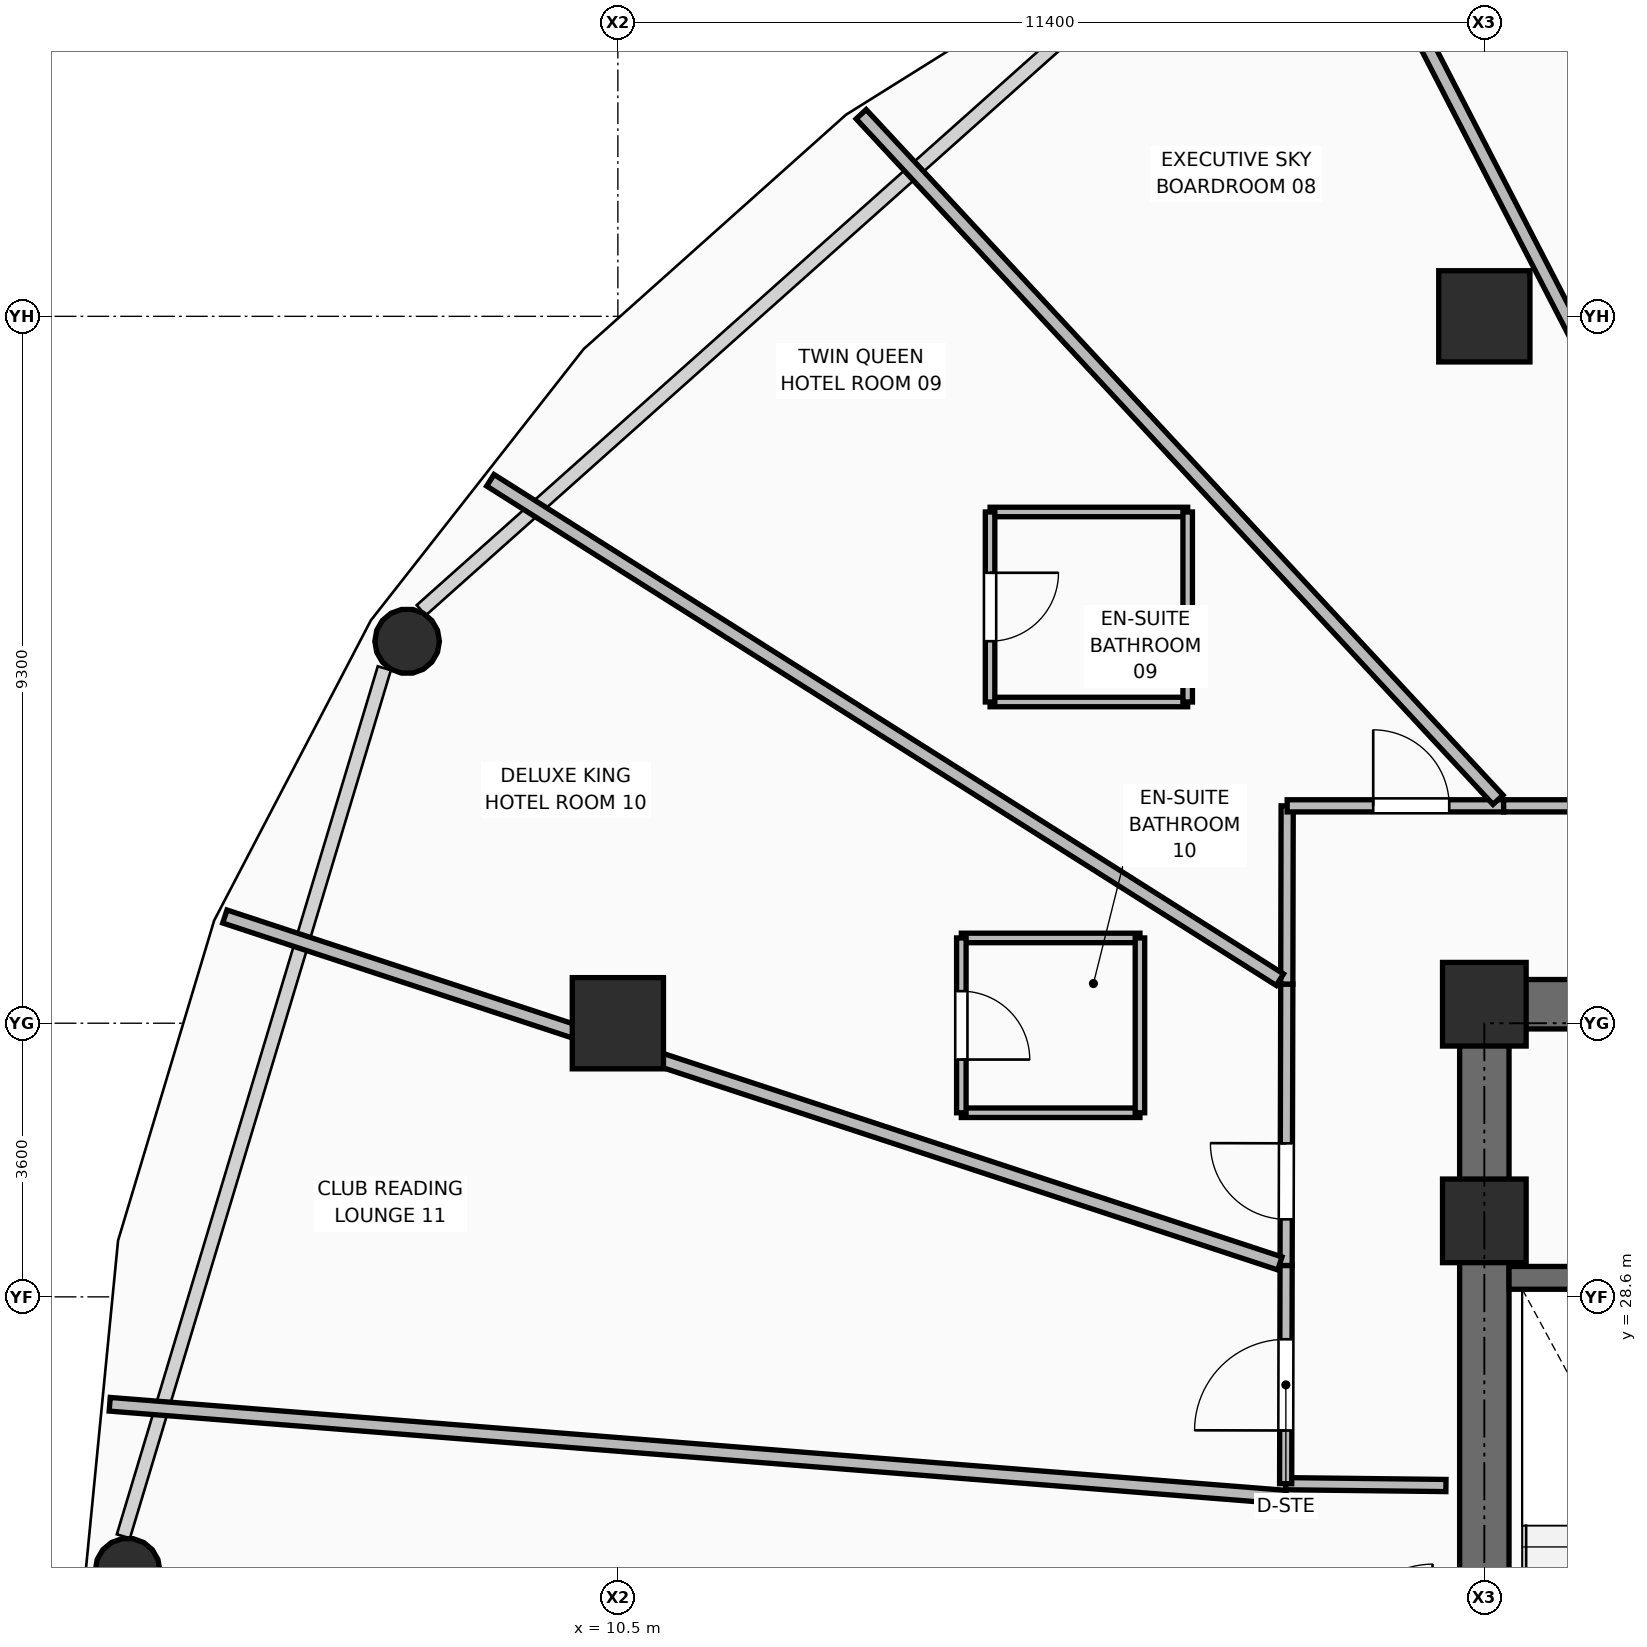
"""IFC4 building model, lengths in metres.
Left out: names, types, materials, properties, quantities, classifications, styles, units other than length and angle.
Written with IfcOpenShell. Run it as: python <this file> out.ifc"""

import sys

from ifc_helpers import new_model, si_unit, direction, frame, frame_2d, origin, origin_2d, place, context, subcontext, project, spatial, rectangle, hollow_rectangle, hollow_circle, extrude, element, fill, save


model = new_model("IFC4")
c1 = context("Model", 3, precision=1e-05, world=origin(), true_north=direction((0.0, 1.0)))
c2 = subcontext(c1, "Body", "Model", "MODEL_VIEW")
j1 = project(units=[si_unit("LENGTHUNIT", "METRE"), si_unit("PLANEANGLEUNIT", "RADIAN")], contexts=[c1])
p1 = place(None, origin())
s1 = spatial("IfcSite", under=j1, at=p1, CompositionType="ELEMENT")
p2 = place(p1, origin())
s2 = spatial("IfcBuilding", under=s1, at=p2, CompositionType="ELEMENT")
p3 = place(p2, frame((0.0, 0.0, 64.5)))
s3 = spatial("IfcBuildingStorey", under=s2, at=p3, CompositionType="ELEMENT", Elevation=64.5)
for number, where, z_axis, x_axis in (
    (1, (21.9, 29.6, 0.0), (0.0, 0.0, 1.0), (1.0, 0.0, 0.0)),
    (2, (21.9, 32.45, 0.0), (0.0, 0.0, 1.0), (1.0, 0.0, 0.0)),
):
    element("IfcColumn", number, at=place(p3, frame(where, z_axis=z_axis, x_axis=x_axis)), inside=s3, PredefinedType="COLUMN", context=c2, shape_type="SweptSolid", body=[
        extrude(rectangle(XDim=1.1, YDim=1.1, at=origin_2d()), origin(), (0.0, 0.0, 1.0), 3.75),
    ])
for number, where, z_axis, x_axis in (
    (3, (10.5, 32.2, 0.0), (0.0, 0.0, 1.0), (1.0, 0.0, 0.0)),
    (4, (21.9, 41.5, 0.0), (0.0, 0.0, 1.0), (1.0, 0.0, 0.0)),
):
    element("IfcColumn", number, at=place(p3, frame(where, z_axis=z_axis, x_axis=x_axis)), inside=s3, PredefinedType="COLUMN", context=c2, shape_type="SweptSolid", body=[
        extrude(hollow_rectangle(XDim=1.2, YDim=1.2, WallThickness=0.045, at=origin_2d()), origin(), (0.0, 0.0, 1.0), 3.75),
    ])
p4 = place(p3, frame((7.727, 37.225, 0.0), z_axis=(-0.048413411524, 0.024855404506, 0.998518077178), x_axis=(-0.456724176891, -0.889608355538, 0.0)))
e5 = element("IfcColumn", 5, at=p4, inside=s3, PredefinedType="COLUMN", context=c2, shape_type="SweptSolid", body=[
    extrude(hollow_circle(Radius=0.425, WallThickness=0.04, at=origin_2d()), origin(), (0.0, 0.0, 1.0), 3.575),
])
p5 = place(p3, frame((4.049, 25.0, 0.0), z_axis=(-0.055647755416, 0.0, 0.998450463126), x_axis=(0.0, -1.0, 0.0)))
e6 = element("IfcColumn", 6, at=p5, inside=s3, PredefinedType="COLUMN", context=c2, shape_type="SweptSolid", body=[
    extrude(hollow_circle(Radius=0.425, WallThickness=0.04, at=origin_2d()), origin(), (0.0, 0.0, 1.0), 3.576),
])
p6 = place(p3, frame((21.575, 32.45, 0.0), z_axis=(0.0, 0.0, 1.0), x_axis=(1.0, 0.0, 0.0)))
e7 = element("IfcWall", 7, at=p6, inside=s3, PredefinedType="SHEAR", context=c2, shape_type="SweptSolid", body=[
    extrude(rectangle(XDim=19.85, YDim=0.65, at=frame_2d((9.925, 0.0))), origin(), (0.0, 0.0, 1.0), 3.57),
])
p7 = place(p6, frame((2.175, 0.0, 0.0)))
e8 = element("IfcOpeningElement", 8, at=p7, cuts=e7, PredefinedType="OPENING", context=c2, shape_type="SweptSolid", body=[
    extrude(rectangle(XDim=1.1, YDim=2.1, at=frame_2d((0.55, 1.05))), frame((0.0, 0.335, 0.0), z_axis=(0.0, -1.0, 0.0), x_axis=(1.0, 0.0, 0.0)), (0.0, 0.0, 1.0), 0.67),
])
p8 = place(p6, frame((15.565, 0.0, 0.0)))
e9 = element("IfcOpeningElement", 9, at=p8, cuts=e7, PredefinedType="OPENING", context=c2, shape_type="SweptSolid", body=[
    extrude(rectangle(XDim=1.0, YDim=2.1, at=frame_2d((0.5, 1.05))), frame((0.0, 0.335, 0.0), z_axis=(0.0, -1.0, 0.0), x_axis=(1.0, 0.0, 0.0)), (0.0, 0.0, 1.0), 0.67),
])
p9 = place(p6, frame((17.575, 0.0, 0.0)))
e10 = element("IfcOpeningElement", 10, at=p9, cuts=e7, PredefinedType="OPENING", context=c2, shape_type="SweptSolid", body=[
    extrude(rectangle(XDim=0.9, YDim=2.1, at=frame_2d((0.45, 1.05))), frame((0.0, 0.335, 0.0), z_axis=(0.0, -1.0, 0.0), x_axis=(1.0, 0.0, 0.0)), (0.0, 0.0, 1.0), 0.67),
])
p10 = place(p3, frame((21.9, 18.125, 0.0), z_axis=(0.0, 0.0, 1.0), x_axis=(0.0, 1.0, 0.0)))
e11 = element("IfcWall", 11, at=p10, inside=s3, PredefinedType="SHEAR", context=c2, shape_type="SweptSolid", body=[
    extrude(rectangle(XDim=14.0, YDim=0.65, at=frame_2d((7.0, 0.0))), origin(), (0.0, 0.0, 1.0), 3.57),
])
p11 = place(p3, frame((22.225, 28.85, 0.0), z_axis=(0.0, 0.0, 1.0), x_axis=(1.0, 0.0, 0.0)))
e12 = element("IfcWall", 12, at=p11, inside=s3, PredefinedType="SHEAR", context=c2, shape_type="SweptSolid", body=[
    extrude(rectangle(XDim=3.515, YDim=0.3, at=frame_2d((1.757, 0.0))), origin(), (0.0, 0.0, 1.0), 3.57),
])
p12 = place(p3, frame((21.395, 26.118, 0.0), z_axis=(0.0, 0.0, 1.0), x_axis=(-0.999934344566, 0.011458907294, 0.0)))
e13 = element("IfcWall", 13, at=p12, inside=s3, PredefinedType="PARTITIONING", context=c2, shape_type="SweptSolid", body=[
    extrude(rectangle(XDim=2.109, YDim=0.16, at=frame_2d((1.055, 0.0))), origin(), (0.0, 0.0, 1.0), 3.55),
])
p13 = place(p3, frame((19.286, 26.142, 0.0), z_axis=(0.0, 0.0, 1.0), x_axis=(0.00212602632, 0.999997740003, 0.0)))
e14 = element("IfcWall", 14, at=p13, inside=s3, PredefinedType="PARTITIONING", context=c2, shape_type="SweptSolid", body=[
    extrude(rectangle(XDim=2.871, YDim=0.16, at=frame_2d((1.436, 0.0))), origin(), (0.0, 0.0, 1.0), 3.55),
])
p14 = place(p13, frame((0.7, 0.0, 0.0)))
e15 = element("IfcOpeningElement", 15, at=p14, cuts=e14, PredefinedType="OPENING", context=c2, shape_type="SweptSolid", body=[
    extrude(rectangle(XDim=1.2, YDim=2.1, at=frame_2d((0.6, 1.05))), frame((0.0, 0.09, 0.0), z_axis=(0.0, -1.0, 0.0), x_axis=(1.0, 0.0, 0.0)), (0.0, 0.0, 1.0), 0.18),
])
p15 = place(p3, frame((19.292, 29.013, 0.0), z_axis=(0.0, 0.0, 1.0), x_axis=(0.002439982185, 0.999997023239, 0.0)))
e16 = element("IfcWall", 16, at=p15, inside=s3, PredefinedType="PARTITIONING", context=c2, shape_type="SweptSolid", body=[
    extrude(rectangle(XDim=3.702, YDim=0.16, at=frame_2d((1.851, 0.0))), origin(), (0.0, 0.0, 1.0), 3.55),
])
p16 = place(p15, frame((0.607, 0.0, 0.0)))
e17 = element("IfcOpeningElement", 17, at=p16, cuts=e16, PredefinedType="OPENING", context=c2, shape_type="SweptSolid", body=[
    extrude(rectangle(XDim=1.0, YDim=2.1, at=frame_2d((0.5, 1.05))), frame((0.0, 0.09, 0.0), z_axis=(0.0, -1.0, 0.0), x_axis=(1.0, 0.0, 0.0)), (0.0, 0.0, 1.0), 0.18),
])
p17 = place(p3, frame((19.301, 32.715, 0.0), z_axis=(0.0, 0.0, 1.0), x_axis=(0.002082244315, 0.999997832127, 0.0)))
e18 = element("IfcWall", 18, at=p17, inside=s3, PredefinedType="PARTITIONING", context=c2, shape_type="SweptSolid", body=[
    extrude(rectangle(XDim=2.345, YDim=0.16, at=frame_2d((1.172, 0.0))), origin(), (0.0, 0.0, 1.0), 2.928),
])
p18 = place(p3, frame((19.306, 35.06, 0.0), z_axis=(0.0, 0.0, 1.0), x_axis=(1.0, 0.0, 0.0)))
e19 = element("IfcWall", 19, at=p18, inside=s3, PredefinedType="PARTITIONING", context=c2, shape_type="SweptSolid", body=[
    extrude(rectangle(XDim=2.848, YDim=0.16, at=frame_2d((1.424, 0.0))), origin(), (0.0, 0.0, 1.0), 2.928),
])
p19 = place(p18, frame((1.132, 0.0, 0.0)))
e20 = element("IfcOpeningElement", 20, at=p19, cuts=e19, PredefinedType="OPENING", context=c2, shape_type="SweptSolid", body=[
    extrude(rectangle(XDim=1.0, YDim=2.1, at=frame_2d((0.5, 1.05))), frame((0.0, 0.09, 0.0), z_axis=(0.0, -1.0, 0.0), x_axis=(1.0, 0.0, 0.0)), (0.0, 0.0, 1.0), 0.18),
])
p20 = place(p3, frame((22.154, 35.06, 0.0), z_axis=(0.0, 0.0, 1.0), x_axis=(1.0, 0.0, 0.0)))
e21 = element("IfcWall", 21, at=p20, inside=s3, PredefinedType="PARTITIONING", context=c2, shape_type="SweptSolid", body=[
    extrude(rectangle(XDim=4.152, YDim=0.16, at=frame_2d((2.076, 0.0))), origin(), (0.0, 0.0, 1.0), 3.55),
])
p21 = place(p20, frame((1.476, 0.0, 0.0)))
e22 = element("IfcOpeningElement", 22, at=p21, cuts=e21, PredefinedType="OPENING", context=c2, shape_type="SweptSolid", body=[
    extrude(rectangle(XDim=1.2, YDim=2.1, at=frame_2d((0.6, 1.05))), frame((0.0, 0.09, 0.0), z_axis=(0.0, -1.0, 0.0), x_axis=(1.0, 0.0, 0.0)), (0.0, 0.0, 1.0), 0.18),
])
p22 = place(p3, frame((26.265, 35.14, 0.0), z_axis=(0.0, 0.0, 1.0), x_axis=(-0.458704466824, 0.888588888134, 0.0)))
e23 = element("IfcWall", 23, at=p22, inside=s3, PredefinedType="PARTITIONING", context=c2, shape_type="SweptSolid", body=[
    extrude(rectangle(XDim=13.944, YDim=0.18, at=frame_2d((6.972, 0.0))), origin(), (0.0, 0.0, 1.0), 2.775),
])
p23 = place(p3, frame((22.08, 35.14, 0.0), z_axis=(0.0, 0.0, 1.0), x_axis=(-0.680639721347, 0.732618297427, 0.0)))
e24 = element("IfcWall", 24, at=p23, inside=s3, PredefinedType="PARTITIONING", context=c2, shape_type="SweptSolid", body=[
    extrude(rectangle(XDim=12.311, YDim=0.18, at=frame_2d((6.155, 0.0))), origin(), (0.0, 0.0, 1.0), 2.775),
])
p24 = place(p3, frame((19.21, 32.773, 0.0), z_axis=(0.0, 0.0, 1.0), x_axis=(-0.845148426003, 0.534531699738, 0.0)))
e25 = element("IfcWall", 25, at=p24, inside=s3, PredefinedType="PARTITIONING", context=c2, shape_type="SweptSolid", body=[
    extrude(rectangle(XDim=12.291, YDim=0.18, at=frame_2d((6.146, 0.0))), origin(), (0.0, 0.0, 1.0), 2.775),
])
p25 = place(p3, frame((19.21, 29.04, 0.0), z_axis=(0.0, 0.0, 1.0), x_axis=(-0.949968589429, 0.312345448339, 0.0)))
e26 = element("IfcWall", 26, at=p25, inside=s3, PredefinedType="PARTITIONING", context=c2, shape_type="SweptSolid", body=[
    extrude(rectangle(XDim=14.612, YDim=0.18, at=frame_2d((7.306, 0.0))), origin(), (0.0, 0.0, 1.0), 2.775),
])
p26 = place(p3, frame((19.284, 25.965, 0.0), z_axis=(0.0, 0.0, 1.0), x_axis=(-0.996895062006, 0.078741573192, 0.0)))
e27 = element("IfcWall", 27, at=p26, inside=s3, PredefinedType="PARTITIONING", context=c2, shape_type="SweptSolid", body=[
    extrude(rectangle(XDim=15.518, YDim=0.18, at=frame_2d((7.759, 0.0))), origin(), (0.0, 0.0, 1.0), 2.775),
])
for number, where, z_axis, x_axis in (
    (28, (15.397, 36.426, 0.0), (0.0, 0.0, 1.0), (1.0, 0.0, 0.0)),
    (29, (15.397, 38.926, 0.0), (0.0, 0.0, 1.0), (1.0, 0.0, 0.0)),
):
    element("IfcWall", number, at=place(p3, frame(where, z_axis=z_axis, x_axis=x_axis)), inside=s3, PredefinedType="PARTITIONING", context=c2, shape_type="SweptSolid", body=[
        extrude(rectangle(XDim=2.6, YDim=0.125, at=frame_2d((1.3, 0.0))), origin(), (0.0, 0.0, 1.0), 3.55),
    ])
p27 = place(p3, frame((15.397, 36.426, 0.0), z_axis=(0.0, 0.0, 1.0), x_axis=(0.0, 1.0, 0.0)))
e30 = element("IfcWall", 30, at=p27, inside=s3, PredefinedType="PARTITIONING", context=c2, shape_type="SweptSolid", body=[
    extrude(rectangle(XDim=2.5, YDim=0.125, at=frame_2d((1.25, 0.0))), origin(), (0.0, 0.0, 1.0), 3.55),
])
p28 = place(p27, frame((0.8, 0.0, 0.0)))
e31 = element("IfcOpeningElement", 31, at=p28, cuts=e30, PredefinedType="OPENING", context=c2, shape_type="SweptSolid", body=[
    extrude(rectangle(XDim=0.9, YDim=2.1, at=frame_2d((0.45, 1.05))), frame((0.0, 0.073, 0.0), z_axis=(0.0, -1.0, 0.0), x_axis=(1.0, 0.0, 0.0)), (0.0, 0.0, 1.0), 0.145),
])
p29 = place(p3, frame((17.997, 36.426, 0.0), z_axis=(0.0, 0.0, 1.0), x_axis=(0.0, 1.0, 0.0)))
e32 = element("IfcWall", 32, at=p29, inside=s3, PredefinedType="PARTITIONING", context=c2, shape_type="SweptSolid", body=[
    extrude(rectangle(XDim=2.5, YDim=0.125, at=frame_2d((1.25, 0.0))), origin(), (0.0, 0.0, 1.0), 3.55),
])
for number, where, z_axis, x_axis in (
    (33, (15.019, 31.022, 0.0), (0.0, 0.0, 1.0), (1.0, 0.0, 0.0)),
    (34, (15.019, 33.322, 0.0), (0.0, 0.0, 1.0), (1.0, 0.0, 0.0)),
):
    element("IfcWall", number, at=place(p3, frame(where, z_axis=z_axis, x_axis=x_axis)), inside=s3, PredefinedType="PARTITIONING", context=c2, shape_type="SweptSolid", body=[
        extrude(rectangle(XDim=2.35, YDim=0.125, at=frame_2d((1.175, 0.0))), origin(), (0.0, 0.0, 1.0), 3.55),
    ])
p30 = place(p3, frame((15.019, 31.022, 0.0), z_axis=(0.0, 0.0, 1.0), x_axis=(0.0, 1.0, 0.0)))
e35 = element("IfcWall", 35, at=p30, inside=s3, PredefinedType="PARTITIONING", context=c2, shape_type="SweptSolid", body=[
    extrude(rectangle(XDim=2.3, YDim=0.125, at=frame_2d((1.15, 0.0))), origin(), (0.0, 0.0, 1.0), 3.55),
])
p31 = place(p30, frame((0.7, 0.0, 0.0)))
e36 = element("IfcOpeningElement", 36, at=p31, cuts=e35, PredefinedType="OPENING", context=c2, shape_type="SweptSolid", body=[
    extrude(rectangle(XDim=0.9, YDim=2.1, at=frame_2d((0.45, 1.05))), frame((0.0, 0.073, 0.0), z_axis=(0.0, -1.0, 0.0), x_axis=(1.0, 0.0, 0.0)), (0.0, 0.0, 1.0), 0.145),
])
p32 = place(p3, frame((17.369, 31.022, 0.0), z_axis=(0.0, 0.0, 1.0), x_axis=(0.0, 1.0, 0.0)))
e37 = element("IfcWall", 37, at=p32, inside=s3, PredefinedType="PARTITIONING", context=c2, shape_type="SweptSolid", body=[
    extrude(rectangle(XDim=2.3, YDim=0.125, at=frame_2d((1.15, 0.0))), origin(), (0.0, 0.0, 1.0), 3.55),
])
p33 = place(p28, frame((0.9, 0.0, 0.0), z_axis=(0.0, 0.0, 1.0), x_axis=(-1.0, 0.0, 0.0)))
e38 = element("IfcDoor", 38, at=p33, inside=s3, OperationType="SINGLE_SWING_LEFT", PredefinedType="DOOR", context=c2, shape_type="SweptSolid", body=[
    extrude(rectangle(XDim=0.9, YDim=2.1, at=frame_2d((0.45, 1.05))), frame((0.0, 0.025, 0.0), z_axis=(0.0, -1.0, 0.0), x_axis=(1.0, 0.0, 0.0)), (0.0, 0.0, 1.0), 0.05),
])
fill(e31, e38)
p34 = place(p19, origin())
e39 = element("IfcDoor", 39, at=p34, inside=s3, OperationType="SINGLE_SWING_LEFT", PredefinedType="DOOR", context=c2, shape_type="SweptSolid", body=[
    extrude(rectangle(XDim=1.0, YDim=2.1, at=frame_2d((0.5, 1.05))), frame((0.0, 0.025, 0.0), z_axis=(0.0, -1.0, 0.0), x_axis=(1.0, 0.0, 0.0)), (0.0, 0.0, 1.0), 0.05),
])
fill(e20, e39)
p35 = place(p31, frame((0.9, 0.0, 0.0), z_axis=(0.0, 0.0, 1.0), x_axis=(-1.0, 0.0, 0.0)))
e40 = element("IfcDoor", 40, at=p35, inside=s3, OperationType="SINGLE_SWING_RIGHT", PredefinedType="DOOR", context=c2, shape_type="SweptSolid", body=[
    extrude(rectangle(XDim=0.9, YDim=2.1, at=frame_2d((0.45, 1.05))), frame((0.0, 0.025, 0.0), z_axis=(0.0, -1.0, 0.0), x_axis=(1.0, 0.0, 0.0)), (0.0, 0.0, 1.0), 0.05),
])
fill(e36, e40)
p36 = place(p16, origin())
e41 = element("IfcDoor", 41, at=p36, inside=s3, OperationType="SINGLE_SWING_RIGHT", PredefinedType="DOOR", context=c2, shape_type="SweptSolid", body=[
    extrude(rectangle(XDim=1.0, YDim=2.1, at=frame_2d((0.5, 1.05))), frame((0.0, 0.025, 0.0), z_axis=(0.0, -1.0, 0.0), x_axis=(1.0, 0.0, 0.0)), (0.0, 0.0, 1.0), 0.05),
])
fill(e17, e41)
p37 = place(p14, origin())
e42 = element("IfcDoor", 42, at=p37, inside=s3, OperationType="SINGLE_SWING_LEFT", PredefinedType="DOOR", context=c2, shape_type="SweptSolid", body=[
    extrude(rectangle(XDim=1.2, YDim=2.1, at=frame_2d((0.6, 1.05))), frame((0.0, 0.025, 0.0), z_axis=(0.0, -1.0, 0.0), x_axis=(1.0, 0.0, 0.0)), (0.0, 0.0, 1.0), 0.05),
])
fill(e15, e42)
save(model, sys.argv[1])
